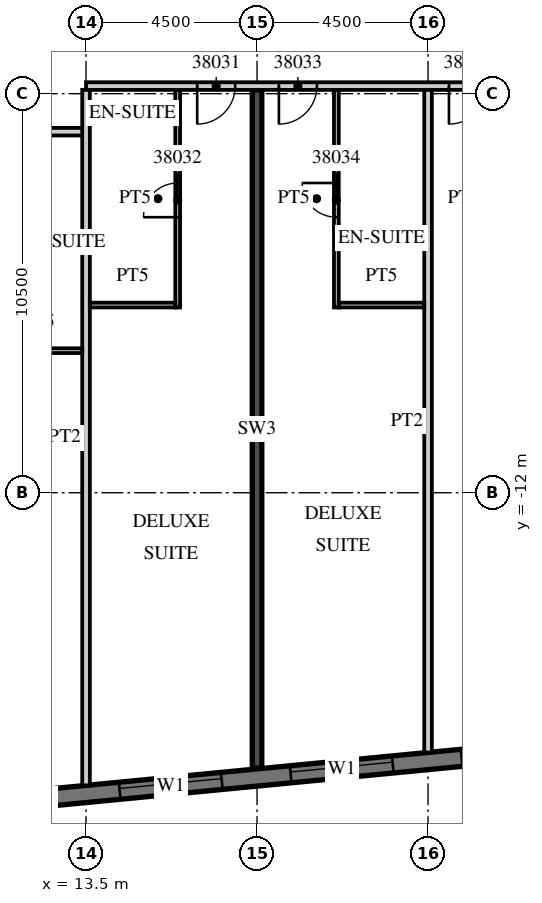
"""IFC4 building model, lengths in metres.
Left out: names, types, materials, properties, quantities, classifications, styles, units other than length and angle.
Written with IfcOpenShell. Run it as: python <this file> out.ifc"""

import sys

from ifc_helpers import new_model, si_unit, direction, frame, frame_2d, origin, place, context, subcontext, project, spatial, rectangle, extrude, element, fill, save


model = new_model("IFC4")
c1 = context("Model", 3, precision=1e-05, world=origin(), true_north=direction((0.0, 1.0)))
c2 = subcontext(c1, "Body", "Model", "MODEL_VIEW")
j1 = project(units=[si_unit("LENGTHUNIT", "METRE"), si_unit("PLANEANGLEUNIT", "RADIAN")], contexts=[c1])
p1 = place(None, origin())
s1 = spatial("IfcSite", under=j1, at=p1, CompositionType="ELEMENT")
p2 = place(p1, origin())
s2 = spatial("IfcBuilding", under=s1, at=p2, CompositionType="ELEMENT")
p3 = place(p2, frame((0.0, 0.0, 166.9)))
s3 = spatial("IfcBuildingStorey", under=s2, at=p3, CompositionType="ELEMENT", Elevation=166.9)
p4 = place(p3, frame((18.0, -19.245, 0.0), z_axis=(0.0, 0.0, 1.0), x_axis=(0.0, 1.0, 0.0)))
e1 = element("IfcWall", 1, at=p4, inside=s3, PredefinedType="SHEAR", context=c2, shape_type="SweptSolid", body=[
    extrude(rectangle(XDim=17.845, YDim=0.25, at=frame_2d((8.923, 0.0))), origin(), (0.0, 0.0, 1.0), 3.3),
])
p5 = place(p3, frame((-13.521, -22.529, 0.0), z_axis=(0.0, 0.0, 1.0), x_axis=(0.995396436651, 0.095843277819, 0.0)))
e2 = element("IfcWall", 2, at=p5, inside=s3, PredefinedType="SOLIDWALL", context=c2, shape_type="SweptSolid", body=[
    extrude(rectangle(XDim=51.578, YDim=0.45, at=frame_2d((25.789, 0.0))), origin(), (0.0, 0.0, 1.0), 3.02),
])
p6 = place(p5, frame((0.91, 0.0, 0.45)))
e3 = element("IfcOpeningElement", 3, at=p6, cuts=e2, PredefinedType="OPENING", context=c2, shape_type="SweptSolid", body=[
    extrude(rectangle(XDim=2.7, YDim=2.25, at=frame_2d((1.35, 1.125))), frame((0.0, 0.235, 0.0), z_axis=(0.0, -1.0, 0.0), x_axis=(1.0, 0.0, 0.0)), (0.0, 0.0, 1.0), 0.47),
])
p7 = place(p5, frame((5.431, 0.0, 0.45)))
e4 = element("IfcOpeningElement", 4, at=p7, cuts=e2, PredefinedType="OPENING", context=c2, shape_type="SweptSolid", body=[
    extrude(rectangle(XDim=2.7, YDim=2.25, at=frame_2d((1.35, 1.125))), frame((0.0, 0.235, 0.0), z_axis=(0.0, -1.0, 0.0), x_axis=(1.0, 0.0, 0.0)), (0.0, 0.0, 1.0), 0.47),
])
p8 = place(p5, frame((9.952, 0.0, 0.45)))
e5 = element("IfcOpeningElement", 5, at=p8, cuts=e2, PredefinedType="OPENING", context=c2, shape_type="SweptSolid", body=[
    extrude(rectangle(XDim=2.7, YDim=2.25, at=frame_2d((1.35, 1.125))), frame((0.0, 0.235, 0.0), z_axis=(0.0, -1.0, 0.0), x_axis=(1.0, 0.0, 0.0)), (0.0, 0.0, 1.0), 0.47),
])
p9 = place(p5, frame((14.473, 0.0, 0.45)))
e6 = element("IfcOpeningElement", 6, at=p9, cuts=e2, PredefinedType="OPENING", context=c2, shape_type="SweptSolid", body=[
    extrude(rectangle(XDim=2.7, YDim=2.25, at=frame_2d((1.35, 1.125))), frame((0.0, 0.235, 0.0), z_axis=(0.0, -1.0, 0.0), x_axis=(1.0, 0.0, 0.0)), (0.0, 0.0, 1.0), 0.47),
])
p10 = place(p5, frame((18.994, 0.0, 0.45)))
e7 = element("IfcOpeningElement", 7, at=p10, cuts=e2, PredefinedType="OPENING", context=c2, shape_type="SweptSolid", body=[
    extrude(rectangle(XDim=2.7, YDim=2.25, at=frame_2d((1.35, 1.125))), frame((0.0, 0.235, 0.0), z_axis=(0.0, -1.0, 0.0), x_axis=(1.0, 0.0, 0.0)), (0.0, 0.0, 1.0), 0.47),
])
p11 = place(p5, frame((23.514, 0.0, 0.45)))
e8 = element("IfcOpeningElement", 8, at=p11, cuts=e2, PredefinedType="OPENING", context=c2, shape_type="SweptSolid", body=[
    extrude(rectangle(XDim=2.7, YDim=2.25, at=frame_2d((1.35, 1.125))), frame((0.0, 0.235, 0.0), z_axis=(0.0, -1.0, 0.0), x_axis=(1.0, 0.0, 0.0)), (0.0, 0.0, 1.0), 0.47),
])
p12 = place(p5, frame((28.035, 0.0, 0.45)))
e9 = element("IfcOpeningElement", 9, at=p12, cuts=e2, PredefinedType="OPENING", context=c2, shape_type="SweptSolid", body=[
    extrude(rectangle(XDim=2.7, YDim=2.25, at=frame_2d((1.35, 1.125))), frame((0.0, 0.235, 0.0), z_axis=(0.0, -1.0, 0.0), x_axis=(1.0, 0.0, 0.0)), (0.0, 0.0, 1.0), 0.47),
])
p13 = place(p5, frame((32.556, 0.0, 0.45)))
e10 = element("IfcOpeningElement", 10, at=p13, cuts=e2, PredefinedType="OPENING", context=c2, shape_type="SweptSolid", body=[
    extrude(rectangle(XDim=2.7, YDim=2.25, at=frame_2d((1.35, 1.125))), frame((0.0, 0.235, 0.0), z_axis=(0.0, -1.0, 0.0), x_axis=(1.0, 0.0, 0.0)), (0.0, 0.0, 1.0), 0.47),
])
p14 = place(p5, frame((37.077, 0.0, 0.45)))
e11 = element("IfcOpeningElement", 11, at=p14, cuts=e2, PredefinedType="OPENING", context=c2, shape_type="SweptSolid", body=[
    extrude(rectangle(XDim=2.7, YDim=2.25, at=frame_2d((1.35, 1.125))), frame((0.0, 0.235, 0.0), z_axis=(0.0, -1.0, 0.0), x_axis=(1.0, 0.0, 0.0)), (0.0, 0.0, 1.0), 0.47),
])
p15 = place(p5, frame((41.598, 0.0, 0.45)))
e12 = element("IfcOpeningElement", 12, at=p15, cuts=e2, PredefinedType="OPENING", context=c2, shape_type="SweptSolid", body=[
    extrude(rectangle(XDim=2.7, YDim=2.25, at=frame_2d((1.35, 1.125))), frame((0.0, 0.235, 0.0), z_axis=(0.0, -1.0, 0.0), x_axis=(1.0, 0.0, 0.0)), (0.0, 0.0, 1.0), 0.47),
])
p16 = place(p5, frame((46.119, 0.0, 0.45)))
e13 = element("IfcOpeningElement", 13, at=p16, cuts=e2, PredefinedType="OPENING", context=c2, shape_type="SweptSolid", body=[
    extrude(rectangle(XDim=2.7, YDim=2.25, at=frame_2d((1.35, 1.125))), frame((0.0, 0.235, 0.0), z_axis=(0.0, -1.0, 0.0), x_axis=(1.0, 0.0, 0.0)), (0.0, 0.0, 1.0), 0.47),
])
p17 = place(p3, frame((-13.5, -2.5, 0.0), z_axis=(0.0, 0.0, 1.0), x_axis=(1.0, 0.0, 0.0)))
e14 = element("IfcWall", 14, at=p17, inside=s3, PredefinedType="PARTITIONING", context=c2, shape_type="SweptSolid", body=[
    extrude(rectangle(XDim=27.0, YDim=0.2, at=frame_2d((13.5, 0.0))), origin(), (0.0, 0.0, 1.0), 3.02),
])
p18 = place(p17, frame((0.575, 0.0, 0.0)))
e15 = element("IfcOpeningElement", 15, at=p18, cuts=e14, PredefinedType="OPENING", context=c2, shape_type="SweptSolid", body=[
    extrude(rectangle(XDim=1.0, YDim=2.1, at=frame_2d((0.5, 1.05))), frame((0.0, 0.11, 0.0), z_axis=(0.0, -1.0, 0.0), x_axis=(1.0, 0.0, 0.0)), (0.0, 0.0, 1.0), 0.22),
])
p19 = place(p17, frame((9.863, 0.0, 0.0)))
e16 = element("IfcOpeningElement", 16, at=p19, cuts=e14, PredefinedType="OPENING", context=c2, shape_type="SweptSolid", body=[
    extrude(rectangle(XDim=1.2, YDim=2.1, at=frame_2d((0.6, 1.05))), frame((0.0, 0.11, 0.0), z_axis=(0.0, -1.0, 0.0), x_axis=(1.0, 0.0, 0.0)), (0.0, 0.0, 1.0), 0.22),
])
p20 = place(p17, frame((15.938, 0.0, 0.0)))
e17 = element("IfcOpeningElement", 17, at=p20, cuts=e14, PredefinedType="OPENING", context=c2, shape_type="SweptSolid", body=[
    extrude(rectangle(XDim=1.2, YDim=2.1, at=frame_2d((0.6, 1.05))), frame((0.0, 0.11, 0.0), z_axis=(0.0, -1.0, 0.0), x_axis=(1.0, 0.0, 0.0)), (0.0, 0.0, 1.0), 0.22),
])
p21 = place(p17, frame((23.075, 0.0, 0.0)))
e18 = element("IfcOpeningElement", 18, at=p21, cuts=e14, PredefinedType="OPENING", context=c2, shape_type="SweptSolid", body=[
    extrude(rectangle(XDim=1.0, YDim=2.1, at=frame_2d((0.5, 1.05))), frame((0.0, 0.11, 0.0), z_axis=(0.0, -1.0, 0.0), x_axis=(1.0, 0.0, 0.0)), (0.0, 0.0, 1.0), 0.22),
])
p22 = place(p3, frame((13.5, -1.3, 0.0), z_axis=(0.0, 0.0, 1.0), x_axis=(1.0, 0.0, 0.0)))
e19 = element("IfcWall", 19, at=p22, inside=s3, PredefinedType="PARTITIONING", context=c2, shape_type="SweptSolid", body=[
    extrude(rectangle(XDim=26.317, YDim=0.2, at=frame_2d((13.158, 0.0))), origin(), (0.0, 0.0, 1.0), 3.02),
])
p23 = place(p22, frame((2.925, 0.0, 0.0)))
e20 = element("IfcOpeningElement", 20, at=p23, cuts=e19, PredefinedType="OPENING", context=c2, shape_type="SweptSolid", body=[
    extrude(rectangle(XDim=1.0, YDim=2.1, at=frame_2d((0.5, 1.05))), frame((0.0, 0.11, 0.0), z_axis=(0.0, -1.0, 0.0), x_axis=(1.0, 0.0, 0.0)), (0.0, 0.0, 1.0), 0.22),
])
p24 = place(p22, frame((5.075, 0.0, 0.0)))
e21 = element("IfcOpeningElement", 21, at=p24, cuts=e19, PredefinedType="OPENING", context=c2, shape_type="SweptSolid", body=[
    extrude(rectangle(XDim=1.0, YDim=2.1, at=frame_2d((0.5, 1.05))), frame((0.0, 0.11, 0.0), z_axis=(0.0, -1.0, 0.0), x_axis=(1.0, 0.0, 0.0)), (0.0, 0.0, 1.0), 0.22),
])
p25 = place(p22, frame((9.55, 0.0, 0.0)))
e22 = element("IfcOpeningElement", 22, at=p25, cuts=e19, PredefinedType="OPENING", context=c2, shape_type="SweptSolid", body=[
    extrude(rectangle(XDim=1.0, YDim=2.1, at=frame_2d((0.5, 1.05))), frame((0.0, 0.11, 0.0), z_axis=(0.0, -1.0, 0.0), x_axis=(1.0, 0.0, 0.0)), (0.0, 0.0, 1.0), 0.22),
])
p26 = place(p22, frame((18.862, 0.0, 0.0)))
e23 = element("IfcOpeningElement", 23, at=p26, cuts=e19, PredefinedType="OPENING", context=c2, shape_type="SweptSolid", body=[
    extrude(rectangle(XDim=1.2, YDim=2.1, at=frame_2d((0.6, 1.05))), frame((0.0, 0.11, 0.0), z_axis=(0.0, -1.0, 0.0), x_axis=(1.0, 0.0, 0.0)), (0.0, 0.0, 1.0), 0.22),
])
p27 = place(p22, frame((25.208, 0.0, 0.0)))
e24 = element("IfcOpeningElement", 24, at=p27, cuts=e19, PredefinedType="OPENING", context=c2, shape_type="SweptSolid", body=[
    extrude(rectangle(XDim=0.9, YDim=2.1, at=frame_2d((0.45, 1.05))), frame((0.0, 0.11, 0.0), z_axis=(0.0, -1.0, 0.0), x_axis=(1.0, 0.0, 0.0)), (0.0, 0.0, 1.0), 0.22),
])
p28 = place(p3, frame((13.5, -19.701, 0.0), z_axis=(0.0, 0.0, 1.0), x_axis=(0.0, 1.0, 0.0)))
e25 = element("IfcWall", 25, at=p28, inside=s3, PredefinedType="PARTITIONING", context=c2, shape_type="SweptSolid", body=[
    extrude(rectangle(XDim=18.301, YDim=0.2, at=frame_2d((9.15, 0.0))), origin(), (0.0, 0.0, 1.0), 3.02),
])
p29 = place(p3, frame((11.15, -8.262, 0.0), z_axis=(0.0, 0.0, 1.0), x_axis=(1.0, 0.0, 0.0)))
e26 = element("IfcWall", 26, at=p29, inside=s3, PredefinedType="PARTITIONING", context=c2, shape_type="SweptSolid", body=[
    extrude(rectangle(XDim=2.25, YDim=0.125, at=frame_2d((1.125, 0.0))), origin(), (0.0, 0.0, 1.0), 3.02),
])
p30 = place(p3, frame((15.912, -7.125, 0.0), z_axis=(0.0, 0.0, 1.0), x_axis=(0.0, 1.0, 0.0)))
e27 = element("IfcWall", 27, at=p30, inside=s3, PredefinedType="PARTITIONING", context=c2, shape_type="SweptSolid", body=[
    extrude(rectangle(XDim=5.725, YDim=0.125, at=frame_2d((2.863, 0.0))), origin(), (0.0, 0.0, 1.0), 3.02),
])
p31 = place(p30, frame((2.375, 0.0, 0.0)))
e28 = element("IfcOpeningElement", 28, at=p31, cuts=e27, PredefinedType="OPENING", context=c2, shape_type="SweptSolid", body=[
    extrude(rectangle(XDim=0.9, YDim=2.1, at=frame_2d((0.45, 1.05))), frame((0.0, 0.073, 0.0), z_axis=(0.0, -1.0, 0.0), x_axis=(1.0, 0.0, 0.0)), (0.0, 0.0, 1.0), 0.145),
])
p32 = place(p3, frame((13.6, -7.062, 0.0), z_axis=(0.0, 0.0, 1.0), x_axis=(1.0, 0.0, 0.0)))
e29 = element("IfcWall", 29, at=p32, inside=s3, PredefinedType="PARTITIONING", context=c2, shape_type="SweptSolid", body=[
    extrude(rectangle(XDim=2.25, YDim=0.125, at=frame_2d((1.125, 0.0))), origin(), (0.0, 0.0, 1.0), 3.02),
])
p33 = place(p3, frame((22.5, -18.834, 0.0), z_axis=(0.0, 0.0, 1.0), x_axis=(0.0, 1.0, 0.0)))
e30 = element("IfcWall", 30, at=p33, inside=s3, PredefinedType="PARTITIONING", context=c2, shape_type="SweptSolid", body=[
    extrude(rectangle(XDim=17.434, YDim=0.2, at=frame_2d((8.717, 0.0))), origin(), (0.0, 0.0, 1.0), 3.02),
])
p34 = place(p3, frame((20.087, -7.125, 0.0), z_axis=(0.0, 0.0, 1.0), x_axis=(0.0, 1.0, 0.0)))
e31 = element("IfcWall", 31, at=p34, inside=s3, PredefinedType="PARTITIONING", context=c2, shape_type="SweptSolid", body=[
    extrude(rectangle(XDim=5.725, YDim=0.125, at=frame_2d((2.863, 0.0))), origin(), (0.0, 0.0, 1.0), 3.02),
])
p35 = place(p34, frame((2.375, 0.0, 0.0)))
e32 = element("IfcOpeningElement", 32, at=p35, cuts=e31, PredefinedType="OPENING", context=c2, shape_type="SweptSolid", body=[
    extrude(rectangle(XDim=0.9, YDim=2.1, at=frame_2d((0.45, 1.05))), frame((0.0, 0.073, 0.0), z_axis=(0.0, -1.0, 0.0), x_axis=(1.0, 0.0, 0.0)), (0.0, 0.0, 1.0), 0.145),
])
p36 = place(p3, frame((20.15, -7.062, 0.0), z_axis=(0.0, 0.0, 1.0), x_axis=(1.0, 0.0, 0.0)))
e33 = element("IfcWall", 33, at=p36, inside=s3, PredefinedType="PARTITIONING", context=c2, shape_type="SweptSolid", body=[
    extrude(rectangle(XDim=2.25, YDim=0.125, at=frame_2d((1.125, 0.0))), origin(), (0.0, 0.0, 1.0), 3.02),
])
p37 = place(p12, origin())
e34 = element("IfcWindow", 34, at=p37, inside=s3, PartitioningType="SINGLE_PANEL", PredefinedType="WINDOW", context=c2, shape_type="SweptSolid", body=[
    extrude(rectangle(XDim=2.7, YDim=2.25, at=frame_2d((1.35, 1.125))), frame((0.0, 0.09, 0.0), z_axis=(0.0, -1.0, 0.0), x_axis=(1.0, 0.0, 0.0)), (0.0, 0.0, 1.0), 0.06),
])
fill(e9, e34)
p38 = place(p13, origin())
e35 = element("IfcWindow", 35, at=p38, inside=s3, PartitioningType="SINGLE_PANEL", PredefinedType="WINDOW", context=c2, shape_type="SweptSolid", body=[
    extrude(rectangle(XDim=2.7, YDim=2.25, at=frame_2d((1.35, 1.125))), frame((0.0, 0.09, 0.0), z_axis=(0.0, -1.0, 0.0), x_axis=(1.0, 0.0, 0.0)), (0.0, 0.0, 1.0), 0.06),
])
fill(e10, e35)
p39 = place(p14, origin())
e36 = element("IfcWindow", 36, at=p39, inside=s3, PartitioningType="SINGLE_PANEL", PredefinedType="WINDOW", context=c2, shape_type="SweptSolid", body=[
    extrude(rectangle(XDim=2.7, YDim=2.25, at=frame_2d((1.35, 1.125))), frame((0.0, 0.09, 0.0), z_axis=(0.0, -1.0, 0.0), x_axis=(1.0, 0.0, 0.0)), (0.0, 0.0, 1.0), 0.06),
])
fill(e11, e36)
p40 = place(p23, origin())
e37 = element("IfcDoor", 37, at=p40, inside=s3, OperationType="SINGLE_SWING_LEFT", PredefinedType="DOOR", context=c2, shape_type="SweptSolid", body=[
    extrude(rectangle(XDim=1.0, YDim=2.1, at=frame_2d((0.5, 1.05))), frame((0.0, 0.025, 0.0), z_axis=(0.0, -1.0, 0.0), x_axis=(1.0, 0.0, 0.0)), (0.0, 0.0, 1.0), 0.05),
])
fill(e20, e37)
p41 = place(p31, origin())
e38 = element("IfcDoor", 38, at=p41, inside=s3, OperationType="SINGLE_SWING_LEFT", PredefinedType="DOOR", context=c2, shape_type="SweptSolid", body=[
    extrude(rectangle(XDim=0.9, YDim=2.1, at=frame_2d((0.45, 1.05))), frame((0.0, 0.025, 0.0), z_axis=(0.0, -1.0, 0.0), x_axis=(1.0, 0.0, 0.0)), (0.0, 0.0, 1.0), 0.05),
])
fill(e28, e38)
p42 = place(p24, origin())
e39 = element("IfcDoor", 39, at=p42, inside=s3, OperationType="SINGLE_SWING_LEFT", PredefinedType="DOOR", context=c2, shape_type="SweptSolid", body=[
    extrude(rectangle(XDim=1.0, YDim=2.1, at=frame_2d((0.5, 1.05))), frame((0.0, 0.025, 0.0), z_axis=(0.0, -1.0, 0.0), x_axis=(1.0, 0.0, 0.0)), (0.0, 0.0, 1.0), 0.05),
])
fill(e21, e39)
p43 = place(p35, origin())
e40 = element("IfcDoor", 40, at=p43, inside=s3, OperationType="SINGLE_SWING_RIGHT", PredefinedType="DOOR", context=c2, shape_type="SweptSolid", body=[
    extrude(rectangle(XDim=0.9, YDim=2.1, at=frame_2d((0.45, 1.05))), frame((0.0, 0.025, 0.0), z_axis=(0.0, -1.0, 0.0), x_axis=(1.0, 0.0, 0.0)), (0.0, 0.0, 1.0), 0.05),
])
fill(e32, e40)
p44 = place(p25, origin())
e41 = element("IfcDoor", 41, at=p44, inside=s3, OperationType="SINGLE_SWING_LEFT", PredefinedType="DOOR", context=c2, shape_type="SweptSolid", body=[
    extrude(rectangle(XDim=1.0, YDim=2.1, at=frame_2d((0.5, 1.05))), frame((0.0, 0.025, 0.0), z_axis=(0.0, -1.0, 0.0), x_axis=(1.0, 0.0, 0.0)), (0.0, 0.0, 1.0), 0.05),
])
fill(e22, e41)
save(model, sys.argv[1])
